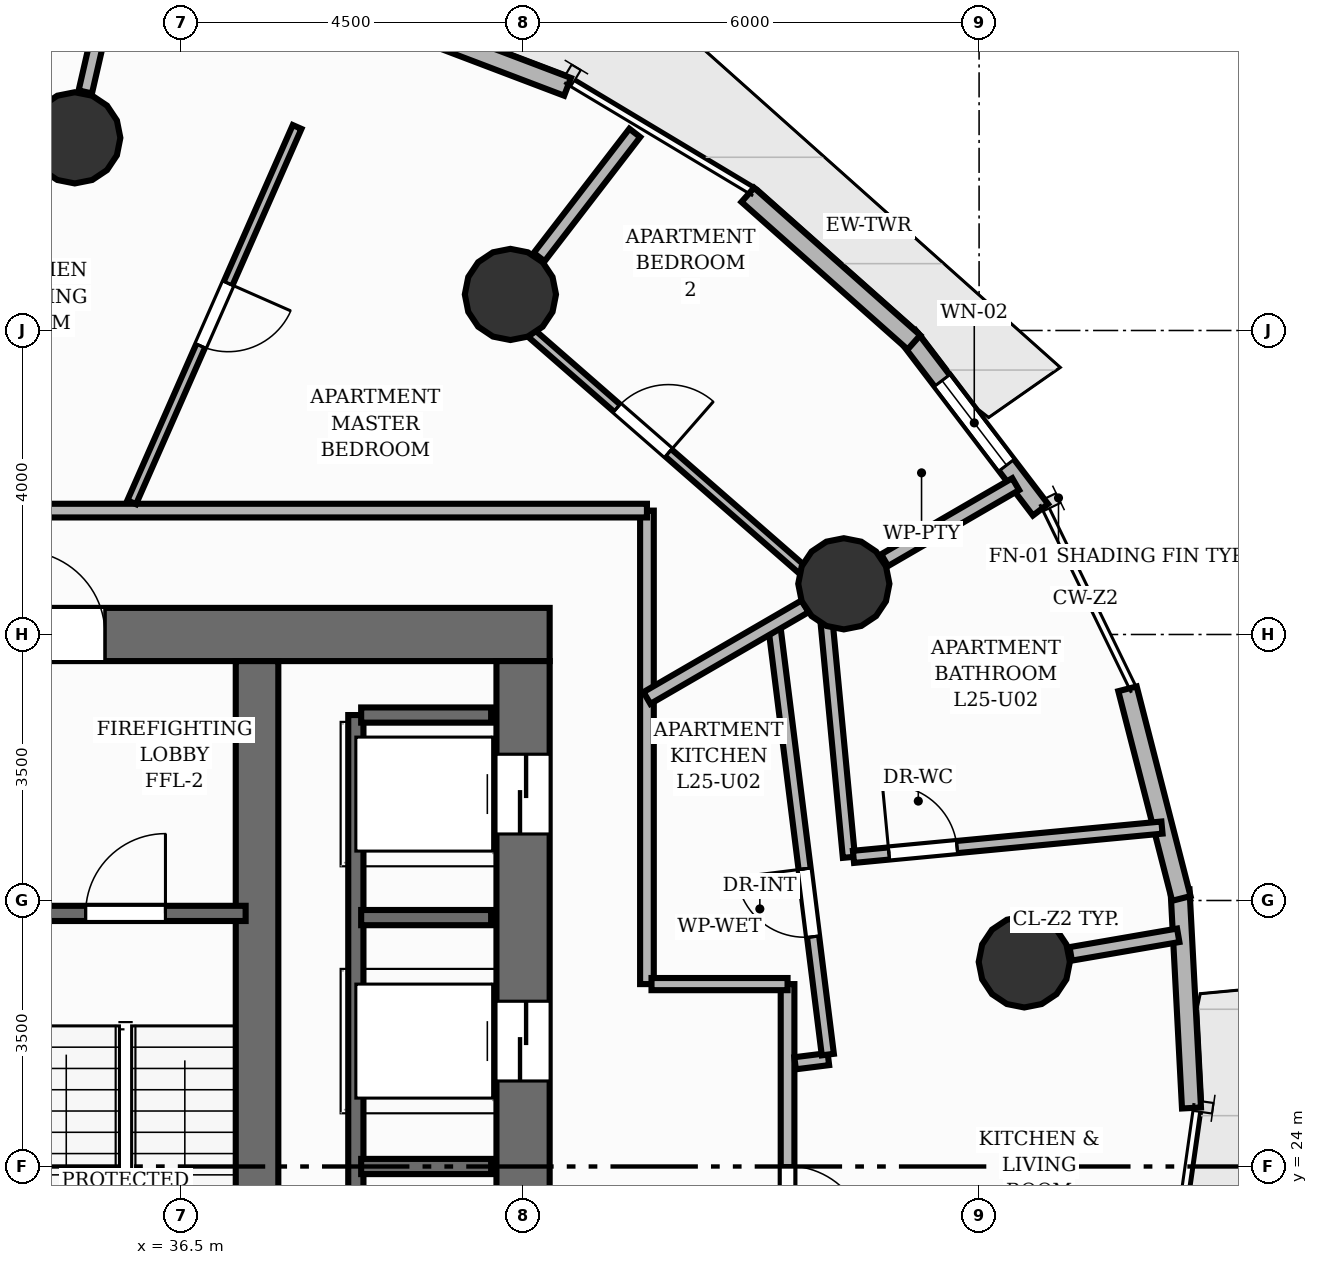
"""IFC4 building model, lengths in metres.
Left out: names, types, materials, properties, quantities, classifications, styles, units other than length and angle.
Written with IfcOpenShell. Run it as: python <this file> out.ifc"""

import sys

from ifc_helpers import new_model, si_unit, direction, frame, frame_2d, origin, origin_2d, place, context, subcontext, project, spatial, rectangle, circle, extrude, element, fill, save


model = new_model("IFC4")
c1 = context("Model", 3, precision=1e-05, world=origin(), true_north=direction((0.0, 1.0)))
c2 = subcontext(c1, "Body", "Model", "MODEL_VIEW")
j1 = project(units=[si_unit("LENGTHUNIT", "METRE"), si_unit("PLANEANGLEUNIT", "RADIAN")], contexts=[c1])
p1 = place(None, origin())
s1 = spatial("IfcSite", under=j1, at=p1, CompositionType="ELEMENT")
p2 = place(p1, origin())
s2 = spatial("IfcBuilding", under=s1, at=p2, CompositionType="ELEMENT")
p3 = place(p2, frame((0.0, 0.0, 86.88)))
s3 = spatial("IfcBuildingStorey", under=s2, at=p3, CompositionType="ELEMENT", Elevation=86.88)
p4 = place(p3, frame((22.65, 31.0, 0.0), z_axis=(0.0, 0.0, 1.0), x_axis=(1.0, 0.0, 0.0)))
e1 = element("IfcWall", 1, at=p4, inside=s3, PredefinedType="SHEAR", context=c2, shape_type="SweptSolid", body=[
    extrude(rectangle(XDim=18.7, YDim=0.7, at=frame_2d((9.35, 0.0))), origin(), (0.0, 0.0, 1.0), 3.2),
])
p5 = place(p4, frame((11.75, 0.0, 0.0)))
e2 = element("IfcOpeningElement", 2, at=p5, cuts=e1, PredefinedType="OPENING", context=c2, shape_type="SweptSolid", body=[
    extrude(rectangle(XDim=1.1, YDim=2.15, at=frame_2d((0.55, 1.075))), frame((0.0, 0.36, 0.0), z_axis=(0.0, -1.0, 0.0), x_axis=(1.0, 0.0, 0.0)), (0.0, 0.0, 1.0), 0.72),
])
p6 = place(p3, frame((41.0, 17.35, 0.0), z_axis=(0.0, 0.0, 1.0), x_axis=(0.0, 1.0, 0.0)))
e3 = element("IfcWall", 3, at=p6, inside=s3, PredefinedType="SHEAR", context=c2, shape_type="SweptSolid", body=[
    extrude(rectangle(XDim=13.3, YDim=0.7, at=frame_2d((6.65, 0.0))), origin(), (0.0, 0.0, 1.0), 3.2),
])
p7 = place(p6, frame((1.225, 0.0, 0.0)))
e4 = element("IfcOpeningElement", 4, at=p7, cuts=e3, PredefinedType="OPENING", context=c2, shape_type="SweptSolid", body=[
    extrude(rectangle(XDim=1.05, YDim=2.15, at=frame_2d((0.525, 1.075))), frame((0.0, 0.36, 0.0), z_axis=(0.0, -1.0, 0.0), x_axis=(1.0, 0.0, 0.0)), (0.0, 0.0, 1.0), 0.72),
])
p8 = place(p6, frame((4.475, 0.0, 0.0)))
e5 = element("IfcOpeningElement", 5, at=p8, cuts=e3, PredefinedType="OPENING", context=c2, shape_type="SweptSolid", body=[
    extrude(rectangle(XDim=1.05, YDim=2.15, at=frame_2d((0.525, 1.075))), frame((0.0, 0.36, 0.0), z_axis=(0.0, -1.0, 0.0), x_axis=(1.0, 0.0, 0.0)), (0.0, 0.0, 1.0), 0.72),
])
p9 = place(p6, frame((7.775, 0.0, 0.0)))
e6 = element("IfcOpeningElement", 6, at=p9, cuts=e3, PredefinedType="OPENING", context=c2, shape_type="SweptSolid", body=[
    extrude(rectangle(XDim=1.05, YDim=2.15, at=frame_2d((0.525, 1.075))), frame((0.0, 0.36, 0.0), z_axis=(0.0, -1.0, 0.0), x_axis=(1.0, 0.0, 0.0)), (0.0, 0.0, 1.0), 0.72),
])
p10 = place(p6, frame((11.025, 0.0, 0.0)))
e7 = element("IfcOpeningElement", 7, at=p10, cuts=e3, PredefinedType="OPENING", context=c2, shape_type="SweptSolid", body=[
    extrude(rectangle(XDim=1.05, YDim=2.15, at=frame_2d((0.525, 1.075))), frame((0.0, 0.36, 0.0), z_axis=(0.0, -1.0, 0.0), x_axis=(1.0, 0.0, 0.0)), (0.0, 0.0, 1.0), 0.72),
])
p11 = place(p3, frame((37.5, 17.35, 0.0), z_axis=(0.0, 0.0, 1.0), x_axis=(0.0, 1.0, 0.0)))
e8 = element("IfcWall", 8, at=p11, inside=s3, PredefinedType="SHEAR", context=c2, shape_type="SweptSolid", body=[
    extrude(rectangle(XDim=13.3, YDim=0.56, at=frame_2d((6.65, 0.0))), origin(), (0.0, 0.0, 1.0), 3.2),
])
for number, where, z_axis, x_axis in (
    (9, (47.594, 26.692, 0.0), (0.0, 0.0, 1.0), (1.0, 0.0, 0.0)),
    (10, (45.22, 31.667, 0.0), (0.0, 0.0, 1.0), (1.0, 0.0, 0.0)),
    (11, (40.833, 35.474, 0.0), (0.0, 0.0, 1.0), (1.0, 0.0, 0.0)),
    (12, (35.102, 37.535, 0.0), (0.0, 0.0, 1.0), (1.0, 0.0, 0.0)),
):
    element("IfcColumn", number, at=place(p3, frame(where, z_axis=z_axis, x_axis=x_axis)), inside=s3, PredefinedType="COLUMN", context=c2, shape_type="SweptSolid", body=[
        extrude(circle(Radius=0.6, at=origin_2d()), origin(), (0.0, 0.0, 1.0), 3.2),
    ])
p12 = place(p3, frame((46.065, 34.927, 0.0), z_axis=(0.0, 0.0, 1.0), x_axis=(0.606166055027, -0.795338112838, 0.0)))
e13 = element("IfcWall", 13, at=p12, inside=s3, PredefinedType="SOLIDWALL", context=c2, shape_type="SweptSolid", body=[
    extrude(rectangle(XDim=2.874, YDim=0.25, at=frame_2d((1.437, 0.0))), origin(), (0.0, 0.0, 1.0), 2.96),
])
p13 = place(p12, frame((0.737, 0.0, 0.85)))
e14 = element("IfcOpeningElement", 14, at=p13, cuts=e13, PredefinedType="OPENING", context=c2, shape_type="SweptSolid", body=[
    extrude(rectangle(XDim=1.4, YDim=1.37, at=frame_2d((0.7, 0.685))), frame((0.0, 0.135, 0.0), z_axis=(0.0, -1.0, 0.0), x_axis=(1.0, 0.0, 0.0)), (0.0, 0.0, 1.0), 0.27),
])
p14 = place(p3, frame((43.957, 36.784, 0.0), z_axis=(0.0, 0.0, 1.0), x_axis=(0.747828492436, -0.663891968547, 0.0)))
e15 = element("IfcWall", 15, at=p14, inside=s3, PredefinedType="SOLIDWALL", context=c2, shape_type="SweptSolid", body=[
    extrude(rectangle(XDim=2.923, YDim=0.25, at=frame_2d((1.461, 0.0))), origin(), (0.0, 0.0, 1.0), 2.96),
])
p15 = place(p3, frame((38.724, 39.293, 0.0), z_axis=(0.0, 0.0, 1.0), x_axis=(0.934815891493, -0.355132720277, 0.0)))
e16 = element("IfcWall", 16, at=p15, inside=s3, PredefinedType="SOLIDWALL", context=c2, shape_type="SweptSolid", body=[
    extrude(rectangle(XDim=3.061, YDim=0.25, at=frame_2d((1.53, 0.0))), origin(), (0.0, 0.0, 1.0), 2.96),
])
p16 = place(p3, frame((49.644, 27.64, 0.0), z_axis=(0.0, 0.0, 1.0), x_axis=(0.052411702269, -0.998625562193, 0.0)))
e17 = element("IfcWall", 17, at=p16, inside=s3, PredefinedType="SOLIDWALL", context=c2, shape_type="SweptSolid", body=[
    extrude(rectangle(XDim=2.874, YDim=0.25, at=frame_2d((1.437, 0.0))), origin(), (0.0, 0.0, 1.0), 2.96),
])
p17 = place(p3, frame((48.953, 30.285, 0.0), z_axis=(0.0, 0.0, 1.0), x_axis=(0.248825035787, -0.96854845081, 0.0)))
e18 = element("IfcWall", 18, at=p17, inside=s3, PredefinedType="SOLIDWALL", context=c2, shape_type="SweptSolid", body=[
    extrude(rectangle(XDim=2.847, YDim=0.25, at=frame_2d((1.424, 0.0))), origin(), (0.0, 0.0, 1.0), 2.96),
])
p18 = place(p3, frame((34.11, 27.33, 0.0), z_axis=(0.0, 0.0, 1.0), x_axis=(1.0, 0.0, 0.0)))
e19 = element("IfcWall", 19, at=p18, inside=s3, PredefinedType="SHEAR", context=c2, shape_type="SweptSolid", body=[
    extrude(rectangle(XDim=3.24, YDim=0.2, at=frame_2d((1.62, 0.0))), origin(), (0.0, 0.0, 1.0), 3.2),
])
p19 = place(p18, frame((1.135, 0.0, 0.0)))
e20 = element("IfcOpeningElement", 20, at=p19, cuts=e19, PredefinedType="OPENING", context=c2, shape_type="SweptSolid", body=[
    extrude(rectangle(XDim=1.05, YDim=2.15, at=frame_2d((0.525, 1.075))), frame((0.0, 0.11, 0.0), z_axis=(0.0, -1.0, 0.0), x_axis=(1.0, 0.0, 0.0)), (0.0, 0.0, 1.0), 0.22),
])
p20 = place(p3, frame((38.8, 18.06, 0.0), z_axis=(0.0, 0.0, 1.0), x_axis=(0.0, 1.0, 0.0)))
e21 = element("IfcWall", 21, at=p20, inside=s3, PredefinedType="SHEAR", context=c2, shape_type="SweptSolid", body=[
    extrude(rectangle(XDim=11.88, YDim=0.2, at=frame_2d((5.94, 0.0))), origin(), (0.0, 0.0, 1.0), 3.2),
])
for number, where, z_axis, x_axis in (
    (22, (38.87, 29.94, 0.0), (0.0, 0.0, 1.0), (1.0, 0.0, 0.0)),
    (23, (38.87, 24.0, 0.0), (0.0, 0.0, 1.0), (1.0, 0.0, 0.0)),
    (24, (38.87, 27.275, 0.0), (0.0, 0.0, 1.0), (1.0, 0.0, 0.0)),
):
    element("IfcWall", number, at=place(p3, frame(where, z_axis=z_axis, x_axis=x_axis)), inside=s3, PredefinedType="SHEAR", context=c2, shape_type="SweptSolid", body=[
        extrude(rectangle(XDim=1.71, YDim=0.2, at=frame_2d((0.855, 0.0))), origin(), (0.0, 0.0, 1.0), 3.2),
    ])
p21 = place(p3, frame((48.206, 26.798, 0.0), z_axis=(0.0, 0.0, 1.0), x_axis=(0.985402123708, 0.170242928172, 0.0)))
e25 = element("IfcWall", 25, at=p21, inside=s3, PredefinedType="PARTITIONING", context=c2, shape_type="SweptSolid", body=[
    extrude(rectangle(XDim=1.436, YDim=0.18, at=frame_2d((0.718, 0.0))), origin(), (0.0, 0.0, 1.0), 2.261),
])
p22 = place(p3, frame((45.757, 31.978, 0.0), z_axis=(0.0, 0.0, 1.0), x_axis=(0.865046065875, 0.501692439563, 0.0)))
e26 = element("IfcWall", 26, at=p22, inside=s3, PredefinedType="PARTITIONING", context=c2, shape_type="SweptSolid", body=[
    extrude(rectangle(XDim=1.994, YDim=0.18, at=frame_2d((0.997, 0.0))), origin(), (0.0, 0.0, 1.0), 2.261),
])
p23 = place(p3, frame((41.212, 35.966, 0.0), z_axis=(0.0, 0.0, 1.0), x_axis=(0.609991040385, 0.792408310564, 0.0)))
e27 = element("IfcWall", 27, at=p23, inside=s3, PredefinedType="PARTITIONING", context=c2, shape_type="SweptSolid", body=[
    extrude(rectangle(XDim=2.062, YDim=0.18, at=frame_2d((1.031, 0.0))), origin(), (0.0, 0.0, 1.0), 2.261),
])
p24 = place(p3, frame((35.24, 38.139, 0.0), z_axis=(0.0, 0.0, 1.0), x_axis=(0.223359217097, 0.974736200281, 0.0)))
e28 = element("IfcWall", 28, at=p24, inside=s3, PredefinedType="PARTITIONING", context=c2, shape_type="SweptSolid", body=[
    extrude(rectangle(XDim=1.712, YDim=0.18, at=frame_2d((0.856, 0.0))), origin(), (0.0, 0.0, 1.0), 2.261),
])
p25 = place(p3, frame((44.48, 26.4, 0.0), z_axis=(0.0, 0.0, 1.0), x_axis=(0.0, -1.0, 0.0)))
e29 = element("IfcWall", 29, at=p25, inside=s3, PredefinedType="PARTITIONING", context=c2, shape_type="SweptSolid", body=[
    extrude(rectangle(XDim=4.8, YDim=0.18, at=frame_2d((2.4, 0.0))), origin(), (0.0, 0.0, 1.0), 2.955),
])
p26 = place(p25, frame((2.392, 0.0, 0.0)))
e30 = element("IfcOpeningElement", 30, at=p26, cuts=e29, PredefinedType="OPENING", context=c2, shape_type="SweptSolid", body=[
    extrude(rectangle(XDim=1.05, YDim=2.15, at=frame_2d((0.525, 1.075))), frame((0.0, 0.1, 0.0), z_axis=(0.0, -1.0, 0.0), x_axis=(1.0, 0.0, 0.0)), (0.0, 0.0, 1.0), 0.2),
])
p27 = place(p3, frame((42.63, 32.63, 0.0), z_axis=(0.0, 0.0, 1.0), x_axis=(0.0, -1.0, 0.0)))
e31 = element("IfcWall", 31, at=p27, inside=s3, PredefinedType="PARTITIONING", context=c2, shape_type="SweptSolid", body=[
    extrude(rectangle(XDim=6.23, YDim=0.18, at=frame_2d((3.115, 0.0))), origin(), (0.0, 0.0, 1.0), 2.955),
])
p28 = place(p3, frame((42.69, 26.4, 0.0), z_axis=(0.0, 0.0, 1.0), x_axis=(1.0, 0.0, 0.0)))
e32 = element("IfcWall", 32, at=p28, inside=s3, PredefinedType="PLUMBINGWALL", context=c2, shape_type="SweptSolid", body=[
    extrude(rectangle(XDim=1.79, YDim=0.16, at=frame_2d((0.895, 0.0))), origin(), (0.0, 0.0, 1.0), 2.261),
])
p29 = place(p3, frame((22.351, 32.63, 0.0), z_axis=(0.0, 0.0, 1.0), x_axis=(1.0, 0.0, 0.0)))
e33 = element("IfcWall", 33, at=p29, inside=s3, PredefinedType="PARTITIONING", context=c2, shape_type="SweptSolid", body=[
    extrude(rectangle(XDim=20.279, YDim=0.18, at=frame_2d((10.14, 0.0))), origin(), (0.0, 0.0, 1.0), 2.955),
])
p30 = place(p29, frame((11.378, 0.0, 0.0)))
e34 = element("IfcOpeningElement", 34, at=p30, cuts=e33, PredefinedType="OPENING", context=c2, shape_type="SweptSolid", body=[
    extrude(rectangle(XDim=1.05, YDim=2.15, at=frame_2d((0.525, 1.075))), frame((0.0, 0.1, 0.0), z_axis=(0.0, -1.0, 0.0), x_axis=(1.0, 0.0, 0.0)), (0.0, 0.0, 1.0), 0.2),
])
p31 = place(p3, frame((44.997, 31.13, 0.0), z_axis=(0.0, 0.0, 1.0), x_axis=(0.094558062352, -0.995519348302, 0.0)))
e35 = element("IfcWall", 35, at=p31, inside=s3, PredefinedType="PLUMBINGWALL", context=c2, shape_type="SweptSolid", body=[
    extrude(rectangle(XDim=3.075, YDim=0.16, at=frame_2d((1.538, 0.0))), origin(), (0.0, 0.0, 1.0), 2.955),
])
p32 = place(p3, frame((45.347, 28.074, 0.0), z_axis=(0.0, 0.0, 1.0), x_axis=(0.995525564748, 0.09449259195, 0.0)))
e36 = element("IfcWall", 36, at=p32, inside=s3, PredefinedType="PLUMBINGWALL", context=c2, shape_type="SweptSolid", body=[
    extrude(rectangle(XDim=4.077, YDim=0.16, at=frame_2d((2.039, 0.0))), origin(), (0.0, 0.0, 1.0), 2.642),
])
p33 = place(p32, frame((0.469, 0.0, 0.0)))
e37 = element("IfcOpeningElement", 37, at=p33, cuts=e36, PredefinedType="OPENING", context=c2, shape_type="SweptSolid", body=[
    extrude(rectangle(XDim=0.9, YDim=2.1, at=frame_2d((0.45, 1.05))), frame((0.0, 0.09, 0.0), z_axis=(0.0, -1.0, 0.0), x_axis=(1.0, 0.0, 0.0)), (0.0, 0.0, 1.0), 0.18),
])
p34 = place(p3, frame((44.579, 25.358, 0.0), z_axis=(0.0, 0.0, 1.0), x_axis=(0.992294886409, 0.123898581135, 0.0)))
e38 = element("IfcWall", 38, at=p34, inside=s3, PredefinedType="PLUMBINGWALL", context=c2, shape_type="SweptSolid", body=[
    extrude(rectangle(XDim=0.441, YDim=0.16, at=frame_2d((0.221, 0.0))), origin(), (0.0, 0.0, 1.0), 2.955),
])
p35 = place(p3, frame((45.01, 25.473, 0.0), z_axis=(0.0, 0.0, 1.0), x_axis=(-0.123955741663, 0.992287747636, 0.0)))
e39 = element("IfcWall", 39, at=p35, inside=s3, PredefinedType="PLUMBINGWALL", context=c2, shape_type="SweptSolid", body=[
    extrude(rectangle(XDim=5.706, YDim=0.16, at=frame_2d((2.853, 0.0))), origin(), (0.0, 0.0, 1.0), 2.955),
])
p36 = place(p35, frame((1.563, 0.0, 0.0)))
e40 = element("IfcOpeningElement", 40, at=p36, cuts=e39, PredefinedType="OPENING", context=c2, shape_type="SweptSolid", body=[
    extrude(rectangle(XDim=0.9, YDim=2.1, at=frame_2d((0.45, 1.05))), frame((0.0, 0.09, 0.0), z_axis=(0.0, -1.0, 0.0), x_axis=(1.0, 0.0, 0.0)), (0.0, 0.0, 1.0), 0.18),
])
p37 = place(p3, frame((42.63, 30.165, 0.0), z_axis=(0.0, 0.0, 1.0), x_axis=(0.86502326608, 0.501731750182, 0.0)))
e41 = element("IfcWall", 41, at=p37, inside=s3, PredefinedType="PARTITIONING", context=c2, shape_type="SweptSolid", body=[
    extrude(rectangle(XDim=2.407, YDim=0.18, at=frame_2d((1.204, 0.0))), origin(), (0.0, 0.0, 1.0), 2.261),
])
p38 = place(p3, frame((38.027, 37.678, 0.0), z_axis=(0.0, 0.0, 1.0), x_axis=(-0.403235845427, -0.91509608947, 0.0)))
e42 = element("IfcWall", 42, at=p38, inside=s3, PredefinedType="PARTITIONING", context=c2, shape_type="SweptSolid", body=[
    extrude(rectangle(XDim=5.396, YDim=0.125, at=frame_2d((2.698, 0.0))), origin(), (0.0, 0.0, 1.0), 2.955),
])
p39 = place(p38, frame((2.248, 0.0, 0.0)))
e43 = element("IfcOpeningElement", 43, at=p39, cuts=e42, PredefinedType="OPENING", context=c2, shape_type="SweptSolid", body=[
    extrude(rectangle(XDim=0.9, YDim=2.1, at=frame_2d((0.45, 1.05))), frame((0.0, 0.073, 0.0), z_axis=(0.0, -1.0, 0.0), x_axis=(1.0, 0.0, 0.0)), (0.0, 0.0, 1.0), 0.145),
])
p40 = place(p3, frame((41.112, 34.96, 0.0), z_axis=(0.0, 0.0, 1.0), x_axis=(0.753425123405, -0.657533712765, 0.0)))
e44 = element("IfcWall", 44, at=p40, inside=s3, PredefinedType="PARTITIONING", context=c2, shape_type="SweptSolid", body=[
    extrude(rectangle(XDim=4.72, YDim=0.125, at=frame_2d((2.36, 0.0))), origin(), (0.0, 0.0, 1.0), 2.404),
])
p41 = place(p40, frame((1.49, 0.0, 0.0)))
e45 = element("IfcOpeningElement", 45, at=p41, cuts=e44, PredefinedType="OPENING", context=c2, shape_type="SweptSolid", body=[
    extrude(rectangle(XDim=0.9, YDim=2.1, at=frame_2d((0.45, 1.05))), frame((0.0, 0.073, 0.0), z_axis=(0.0, -1.0, 0.0), x_axis=(1.0, 0.0, 0.0)), (0.0, 0.0, 1.0), 0.145),
])
p42 = place(p13, origin())
e46 = element("IfcWindow", 46, at=p42, inside=s3, PartitioningType="SINGLE_PANEL", PredefinedType="WINDOW", context=c2, shape_type="SweptSolid", body=[
    extrude(rectangle(XDim=1.4, YDim=1.37, at=frame_2d((0.7, 0.685))), frame((0.0, 0.03, 0.0), z_axis=(0.0, -1.0, 0.0), x_axis=(1.0, 0.0, 0.0)), (0.0, 0.0, 1.0), 0.06),
])
fill(e14, e46)
p43 = place(p19, origin())
e47 = element("IfcDoor", 47, at=p43, inside=s3, OperationType="SINGLE_SWING_RIGHT", PredefinedType="DOOR", context=c2, shape_type="SweptSolid", body=[
    extrude(rectangle(XDim=1.05, YDim=2.15, at=frame_2d((0.525, 1.075))), frame((0.0, 0.025, 0.0), z_axis=(0.0, -1.0, 0.0), x_axis=(1.0, 0.0, 0.0)), (0.0, 0.0, 1.0), 0.05),
])
fill(e20, e47)
p44 = place(p5, origin())
e48 = element("IfcDoor", 48, at=p44, inside=s3, OperationType="SINGLE_SWING_LEFT", PredefinedType="DOOR", context=c2, shape_type="SweptSolid", body=[
    extrude(rectangle(XDim=1.1, YDim=2.15, at=frame_2d((0.55, 1.075))), frame((0.0, 0.025, 0.0), z_axis=(0.0, -1.0, 0.0), x_axis=(1.0, 0.0, 0.0)), (0.0, 0.0, 1.0), 0.05),
])
fill(e2, e48)
p45 = place(p9, origin())
e49 = element("IfcDoor", 49, at=p45, inside=s3, OperationType="DOUBLE_DOOR_SLIDING", PredefinedType="DOOR", context=c2, shape_type="SweptSolid", body=[
    extrude(rectangle(XDim=1.05, YDim=2.15, at=frame_2d((0.525, 1.075))), frame((0.0, 0.025, 0.0), z_axis=(0.0, -1.0, 0.0), x_axis=(1.0, 0.0, 0.0)), (0.0, 0.0, 1.0), 0.05),
])
fill(e6, e49)
p46 = place(p10, origin())
e50 = element("IfcDoor", 50, at=p46, inside=s3, OperationType="DOUBLE_DOOR_SLIDING", PredefinedType="DOOR", context=c2, shape_type="SweptSolid", body=[
    extrude(rectangle(XDim=1.05, YDim=2.15, at=frame_2d((0.525, 1.075))), frame((0.0, 0.025, 0.0), z_axis=(0.0, -1.0, 0.0), x_axis=(1.0, 0.0, 0.0)), (0.0, 0.0, 1.0), 0.05),
])
fill(e7, e50)
p47 = place(p26, origin())
e51 = element("IfcDoor", 51, at=p47, inside=s3, OperationType="SINGLE_SWING_RIGHT", PredefinedType="DOOR", context=c2, shape_type="SweptSolid", body=[
    extrude(rectangle(XDim=1.05, YDim=2.15, at=frame_2d((0.525, 1.075))), frame((0.0, 0.025, 0.0), z_axis=(0.0, -1.0, 0.0), x_axis=(1.0, 0.0, 0.0)), (0.0, 0.0, 1.0), 0.05),
])
fill(e30, e51)
p48 = place(p33, origin())
e52 = element("IfcDoor", 52, at=p48, inside=s3, OperationType="SINGLE_SWING_LEFT", PredefinedType="DOOR", context=c2, shape_type="SweptSolid", body=[
    extrude(rectangle(XDim=0.9, YDim=2.1, at=frame_2d((0.45, 1.05))), frame((0.0, 0.025, 0.0), z_axis=(0.0, -1.0, 0.0), x_axis=(1.0, 0.0, 0.0)), (0.0, 0.0, 1.0), 0.05),
])
fill(e37, e52)
p49 = place(p36, origin())
e53 = element("IfcDoor", 53, at=p49, inside=s3, OperationType="SINGLE_SWING_RIGHT", PredefinedType="DOOR", context=c2, shape_type="SweptSolid", body=[
    extrude(rectangle(XDim=0.9, YDim=2.1, at=frame_2d((0.45, 1.05))), frame((0.0, 0.025, 0.0), z_axis=(0.0, -1.0, 0.0), x_axis=(1.0, 0.0, 0.0)), (0.0, 0.0, 1.0), 0.05),
])
fill(e40, e53)
p50 = place(p39, origin())
e54 = element("IfcDoor", 54, at=p50, inside=s3, OperationType="SINGLE_SWING_LEFT", PredefinedType="DOOR", context=c2, shape_type="SweptSolid", body=[
    extrude(rectangle(XDim=0.9, YDim=2.1, at=frame_2d((0.45, 1.05))), frame((0.0, 0.025, 0.0), z_axis=(0.0, -1.0, 0.0), x_axis=(1.0, 0.0, 0.0)), (0.0, 0.0, 1.0), 0.05),
])
fill(e43, e54)
p51 = place(p41, origin())
e55 = element("IfcDoor", 55, at=p51, inside=s3, OperationType="SINGLE_SWING_RIGHT", PredefinedType="DOOR", context=c2, shape_type="SweptSolid", body=[
    extrude(rectangle(XDim=0.9, YDim=2.1, at=frame_2d((0.45, 1.05))), frame((0.0, 0.025, 0.0), z_axis=(0.0, -1.0, 0.0), x_axis=(1.0, 0.0, 0.0)), (0.0, 0.0, 1.0), 0.05),
])
fill(e45, e55)
save(model, sys.argv[1])
